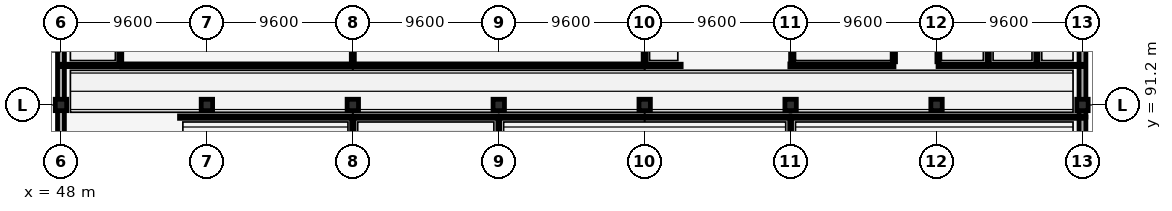
"""IFC4 building model, lengths in metres.
Left out: names, types, materials, properties, quantities, classifications, styles, units other than length and angle.
Written with IfcOpenShell. Run it as: python <this file> out.ifc"""

import sys

from ifc_helpers import new_model, si_unit, direction, frame, frame_2d, origin, origin_2d, place, context, subcontext, project, spatial, rectangle, extrude, element, fill, save


model = new_model("IFC4")
c1 = context("Model", 3, precision=1e-05, world=origin(), true_north=direction((0.0, 1.0)))
c2 = subcontext(c1, "Body", "Model", "MODEL_VIEW")
j1 = project(units=[si_unit("LENGTHUNIT", "METRE"), si_unit("PLANEANGLEUNIT", "RADIAN")], contexts=[c1])
p1 = place(None, origin())
s1 = spatial("IfcSite", under=j1, at=p1, CompositionType="ELEMENT")
p2 = place(p1, origin())
s2 = spatial("IfcBuilding", under=s1, at=p2, CompositionType="ELEMENT")
p3 = place(p2, frame((0.0, 0.0, -4.2)))
s3 = spatial("IfcBuildingStorey", under=s2, at=p3, CompositionType="ELEMENT", Elevation=-4.2)
for number, where, z_axis, x_axis in (
    (1, (48.0, 91.2, 0.0), (0.0, 0.0, 1.0), (1.0, 0.0, 0.0)),
    (2, (57.6, 91.2, 0.0), (0.0, 0.0, 1.0), (1.0, 0.0, 0.0)),
    (3, (67.2, 91.2, 0.0), (0.0, 0.0, 1.0), (1.0, 0.0, 0.0)),
    (4, (76.8, 91.2, 0.0), (0.0, 0.0, 1.0), (1.0, 0.0, 0.0)),
    (5, (86.4, 91.2, 0.0), (0.0, 0.0, 1.0), (1.0, 0.0, 0.0)),
    (6, (96.0, 91.2, 0.0), (0.0, 0.0, 1.0), (1.0, 0.0, 0.0)),
    (7, (105.6, 91.2, 0.0), (0.0, 0.0, 1.0), (1.0, 0.0, 0.0)),
    (8, (115.2, 91.2, 0.0), (0.0, 0.0, 1.0), (1.0, 0.0, 0.0)),
):
    element("IfcColumn", number, at=place(p3, frame(where, z_axis=z_axis, x_axis=x_axis)), inside=s3, PredefinedType="COLUMN", context=c2, shape_type="SweptSolid", body=[
        extrude(rectangle(XDim=0.75, YDim=0.75, at=origin_2d()), origin(), (0.0, 0.0, 1.0), 4.2),
    ])
p4 = place(p3, frame((115.2, 81.2, 0.0), z_axis=(0.0, 0.0, 1.0), x_axis=(0.0, 1.0, 0.0)))
e9 = element("IfcWall", 9, at=p4, inside=s3, PredefinedType="SOLIDWALL", context=c2, shape_type="SweptSolid", body=[
    extrude(rectangle(XDim=9.2, YDim=0.45, at=frame_2d((4.6, 0.0))), origin(), (0.0, 0.0, 1.0), 3.84),
])
p5 = place(p3, frame((115.2, 90.4, 0.0), z_axis=(0.0, 0.0, 1.0), x_axis=(0.0, 1.0, 0.0)))
e10 = element("IfcWall", 10, at=p5, inside=s3, PredefinedType="SOLIDWALL", context=c2, shape_type="SweptSolid", body=[
    extrude(rectangle(XDim=9.2, YDim=0.45, at=frame_2d((4.6, 0.0))), origin(), (0.0, 0.0, 1.0), 3.84),
])
p6 = place(p3, frame((48.0, 95.2, 0.0), z_axis=(0.0, 0.0, 1.0), x_axis=(0.0, -1.0, 0.0)))
e11 = element("IfcWall", 11, at=p6, inside=s3, PredefinedType="SOLIDWALL", context=c2, shape_type="SweptSolid", body=[
    extrude(rectangle(XDim=7.733, YDim=0.45, at=frame_2d((3.866, 0.0))), origin(), (0.0, 0.0, 1.0), 3.84),
])
p7 = place(p3, frame((48.05, 93.8, 0.0), z_axis=(0.0, 0.0, 1.0), x_axis=(1.0, 0.0, 0.0)))
e12 = element("IfcWall", 12, at=p7, inside=s3, PredefinedType="PARTITIONING", context=c2, shape_type="SweptSolid", body=[
    extrude(rectangle(XDim=3.75, YDim=0.16, at=frame_2d((1.875, 0.0))), origin(), (0.0, 0.0, 1.0), 3.84),
])
p8 = place(p7, frame((0.975, 0.0, 0.0)))
e13 = element("IfcOpeningElement", 13, at=p8, cuts=e12, PredefinedType="OPENING", context=c2, shape_type="SweptSolid", body=[
    extrude(rectangle(XDim=1.8, YDim=2.15, at=frame_2d((0.9, 1.075))), frame((0.0, 0.09, 0.0), z_axis=(0.0, -1.0, 0.0), x_axis=(1.0, 0.0, 0.0)), (0.0, 0.0, 1.0), 0.18),
])
p9 = place(p3, frame((51.9, 93.9, 0.0), z_axis=(0.0, 0.0, 1.0), x_axis=(0.0, 1.0, 0.0)))
e14 = element("IfcWall", 14, at=p9, inside=s3, PredefinedType="PARTITIONING", context=c2, shape_type="SweptSolid", body=[
    extrude(rectangle(XDim=6.5, YDim=0.2, at=frame_2d((3.25, 0.0))), origin(), (0.0, 0.0, 1.0), 3.84),
])
p10 = place(p9, frame((2.45, 0.0, 0.0)))
e15 = element("IfcOpeningElement", 15, at=p10, cuts=e14, PredefinedType="OPENING", context=c2, shape_type="SweptSolid", body=[
    extrude(rectangle(XDim=1.6, YDim=2.2, at=frame_2d((0.8, 1.1))), frame((0.0, 0.11, 0.0), z_axis=(0.0, -1.0, 0.0), x_axis=(1.0, 0.0, 0.0)), (0.0, 0.0, 1.0), 0.22),
])
p11 = place(p3, frame((67.2, 81.4, 0.0), z_axis=(0.0, 0.0, 1.0), x_axis=(0.0, 1.0, 0.0)))
e16 = element("IfcWall", 16, at=p11, inside=s3, PredefinedType="PARTITIONING", context=c2, shape_type="SweptSolid", body=[
    extrude(rectangle(XDim=8.9, YDim=0.16, at=frame_2d((4.45, 0.0))), origin(), (0.0, 0.0, 1.0), 3.255),
])
p12 = place(p11, frame((3.9, 0.0, 0.0)))
e17 = element("IfcOpeningElement", 17, at=p12, cuts=e16, PredefinedType="OPENING", context=c2, shape_type="SweptSolid", body=[
    extrude(rectangle(XDim=1.1, YDim=2.18, at=frame_2d((0.55, 1.09))), frame((0.0, 0.09, 0.0), z_axis=(0.0, -1.0, 0.0), x_axis=(1.0, 0.0, 0.0)), (0.0, 0.0, 1.0), 0.18),
])
p13 = place(p3, frame((55.8, 90.4, 0.0), z_axis=(0.0, 0.0, 1.0), x_axis=(1.0, 0.0, 0.0)))
e18 = element("IfcWall", 18, at=p13, inside=s3, PredefinedType="PARTITIONING", context=c2, shape_type="SweptSolid", body=[
    extrude(rectangle(XDim=11.3, YDim=0.16, at=frame_2d((5.65, 0.0))), origin(), (0.0, 0.0, 1.0), 3.84),
])
p14 = place(p13, frame((4.75, 0.0, 0.0)))
e19 = element("IfcOpeningElement", 19, at=p14, cuts=e18, PredefinedType="OPENING", context=c2, shape_type="SweptSolid", body=[
    extrude(rectangle(XDim=1.8, YDim=2.15, at=frame_2d((0.9, 1.075))), frame((0.0, 0.09, 0.0), z_axis=(0.0, -1.0, 0.0), x_axis=(1.0, 0.0, 0.0)), (0.0, 0.0, 1.0), 0.18),
])
p15 = place(p3, frame((76.8, 81.4, 0.0), z_axis=(0.0, 0.0, 1.0), x_axis=(0.0, 1.0, 0.0)))
e20 = element("IfcWall", 20, at=p15, inside=s3, PredefinedType="PARTITIONING", context=c2, shape_type="SweptSolid", body=[
    extrude(rectangle(XDim=8.9, YDim=0.125, at=frame_2d((4.45, 0.0))), origin(), (0.0, 0.0, 1.0), 3.295),
])
p16 = place(p3, frame((67.3, 90.4, 0.0), z_axis=(0.0, 0.0, 1.0), x_axis=(1.0, 0.0, 0.0)))
e21 = element("IfcWall", 21, at=p16, inside=s3, PredefinedType="PARTITIONING", context=c2, shape_type="SweptSolid", body=[
    extrude(rectangle(XDim=9.4, YDim=0.16, at=frame_2d((4.7, 0.0))), origin(), (0.0, 0.0, 1.0), 3.84),
])
p17 = place(p16, frame((4.15, 0.0, 0.0)))
e22 = element("IfcOpeningElement", 22, at=p17, cuts=e21, PredefinedType="OPENING", context=c2, shape_type="SweptSolid", body=[
    extrude(rectangle(XDim=1.1, YDim=2.18, at=frame_2d((0.55, 1.09))), frame((0.0, 0.09, 0.0), z_axis=(0.0, -1.0, 0.0), x_axis=(1.0, 0.0, 0.0)), (0.0, 0.0, 1.0), 0.18),
])
p18 = place(p3, frame((96.0, 72.05, 0.0), z_axis=(0.0, 0.0, 1.0), x_axis=(0.0, 1.0, 0.0)))
e23 = element("IfcWall", 23, at=p18, inside=s3, PredefinedType="PARTITIONING", context=c2, shape_type="SweptSolid", body=[
    extrude(rectangle(XDim=18.25, YDim=0.125, at=frame_2d((9.125, 0.0))), origin(), (0.0, 0.0, 1.0), 3.275),
])
p19 = place(p3, frame((76.9, 90.4, 0.0), z_axis=(0.0, 0.0, 1.0), x_axis=(1.0, 0.0, 0.0)))
e24 = element("IfcWall", 24, at=p19, inside=s3, PredefinedType="PARTITIONING", context=c2, shape_type="SweptSolid", body=[
    extrude(rectangle(XDim=19.05, YDim=0.16, at=frame_2d((9.525, 0.0))), origin(), (0.0, 0.0, 1.0), 3.84),
])
p20 = place(p19, frame((6.391, 0.0, 0.0)))
e25 = element("IfcOpeningElement", 25, at=p20, cuts=e24, PredefinedType="OPENING", context=c2, shape_type="SweptSolid", body=[
    extrude(rectangle(XDim=1.1, YDim=2.18, at=frame_2d((0.55, 1.09))), frame((0.0, 0.09, 0.0), z_axis=(0.0, -1.0, 0.0), x_axis=(1.0, 0.0, 0.0)), (0.0, 0.0, 1.0), 0.18),
])
p21 = place(p3, frame((96.03, 90.4, 0.0), z_axis=(0.0, 0.0, 1.0), x_axis=(1.0, 0.0, 0.0)))
e26 = element("IfcWall", 26, at=p21, inside=s3, PredefinedType="PARTITIONING", context=c2, shape_type="SweptSolid", body=[
    extrude(rectangle(XDim=19.12, YDim=0.16, at=frame_2d((9.56, 0.0))), origin(), (0.0, 0.0, 1.0), 3.84),
])
p22 = place(p21, frame((11.572, 0.0, 0.0)))
e27 = element("IfcOpeningElement", 27, at=p22, cuts=e26, PredefinedType="OPENING", context=c2, shape_type="SweptSolid", body=[
    extrude(rectangle(XDim=1.15, YDim=2.2, at=frame_2d((0.575, 1.1))), frame((0.0, 0.09, 0.0), z_axis=(0.0, -1.0, 0.0), x_axis=(1.0, 0.0, 0.0)), (0.0, 0.0, 1.0), 0.18),
])
p23 = place(p3, frame((86.5, 93.8, 0.0), z_axis=(0.0, 0.0, 1.0), x_axis=(1.0, 0.0, 0.0)))
e28 = element("IfcWall", 28, at=p23, inside=s3, PredefinedType="PARTITIONING", context=c2, shape_type="SweptSolid", body=[
    extrude(rectangle(XDim=2.3, YDim=0.16, at=frame_2d((1.15, 0.0))), origin(), (0.0, 0.0, 1.0), 3.84),
])
p24 = place(p23, frame((0.25, 0.0, 0.0)))
e29 = element("IfcOpeningElement", 29, at=p24, cuts=e28, PredefinedType="OPENING", context=c2, shape_type="SweptSolid", body=[
    extrude(rectangle(XDim=1.8, YDim=2.15, at=frame_2d((0.9, 1.075))), frame((0.0, 0.09, 0.0), z_axis=(0.0, -1.0, 0.0), x_axis=(1.0, 0.0, 0.0)), (0.0, 0.0, 1.0), 0.18),
])
p25 = place(p3, frame((52.0, 93.8, 0.0), z_axis=(0.0, 0.0, 1.0), x_axis=(1.0, 0.0, 0.0)))
e30 = element("IfcWall", 30, at=p25, inside=s3, PredefinedType="PARTITIONING", context=c2, shape_type="SweptSolid", body=[
    extrude(rectangle(XDim=15.1, YDim=0.2, at=frame_2d((7.55, 0.0))), origin(), (0.0, 0.0, 1.0), 3.84),
])
p26 = place(p25, frame((6.75, 0.0, 0.0)))
e31 = element("IfcOpeningElement", 31, at=p26, cuts=e30, PredefinedType="OPENING", context=c2, shape_type="SweptSolid", body=[
    extrude(rectangle(XDim=1.6, YDim=2.2, at=frame_2d((0.8, 1.1))), frame((0.0, 0.11, 0.0), z_axis=(0.0, -1.0, 0.0), x_axis=(1.0, 0.0, 0.0)), (0.0, 0.0, 1.0), 0.22),
])
p27 = place(p3, frame((67.3, 93.8, 0.0), z_axis=(0.0, 0.0, 1.0), x_axis=(1.0, 0.0, 0.0)))
e32 = element("IfcWall", 32, at=p27, inside=s3, PredefinedType="PARTITIONING", context=c2, shape_type="SweptSolid", body=[
    extrude(rectangle(XDim=19.0, YDim=0.2, at=frame_2d((9.5, 0.0))), origin(), (0.0, 0.0, 1.0), 3.84),
])
p28 = place(p27, frame((8.7, 0.0, 0.0)))
e33 = element("IfcOpeningElement", 33, at=p28, cuts=e32, PredefinedType="OPENING", context=c2, shape_type="SweptSolid", body=[
    extrude(rectangle(XDim=1.6, YDim=2.2, at=frame_2d((0.8, 1.1))), frame((0.0, 0.11, 0.0), z_axis=(0.0, -1.0, 0.0), x_axis=(1.0, 0.0, 0.0)), (0.0, 0.0, 1.0), 0.22),
])
p29 = place(p3, frame((95.95, 93.8, 0.0), z_axis=(0.0, 0.0, 1.0), x_axis=(1.0, 0.0, 0.0)))
e34 = element("IfcWall", 34, at=p29, inside=s3, PredefinedType="PARTITIONING", context=c2, shape_type="SweptSolid", body=[
    extrude(rectangle(XDim=6.85, YDim=0.2, at=frame_2d((3.425, 0.0))), origin(), (0.0, 0.0, 1.0), 3.84),
])
p30 = place(p29, frame((2.625, 0.0, 0.0)))
e35 = element("IfcOpeningElement", 35, at=p30, cuts=e34, PredefinedType="OPENING", context=c2, shape_type="SweptSolid", body=[
    extrude(rectangle(XDim=1.6, YDim=2.2, at=frame_2d((0.8, 1.1))), frame((0.0, 0.11, 0.0), z_axis=(0.0, -1.0, 0.0), x_axis=(1.0, 0.0, 0.0)), (0.0, 0.0, 1.0), 0.22),
])
p31 = place(p3, frame((105.7, 93.8, 0.0), z_axis=(0.0, 0.0, 1.0), x_axis=(1.0, 0.0, 0.0)))
e36 = element("IfcWall", 36, at=p31, inside=s3, PredefinedType="PARTITIONING", context=c2, shape_type="SweptSolid", body=[
    extrude(rectangle(XDim=3.2, YDim=0.15, at=frame_2d((1.6, 0.0))), origin(), (0.0, 0.0, 1.0), 3.84),
])
p32 = place(p31, frame((1.15, 0.0, 0.0)))
e37 = element("IfcOpeningElement", 37, at=p32, cuts=e36, PredefinedType="OPENING", context=c2, shape_type="SweptSolid", body=[
    extrude(rectangle(XDim=0.9, YDim=2.15, at=frame_2d((0.45, 1.075))), frame((0.0, 0.085, 0.0), z_axis=(0.0, -1.0, 0.0), x_axis=(1.0, 0.0, 0.0)), (0.0, 0.0, 1.0), 0.17),
])
p33 = place(p3, frame((109.1, 93.8, 0.0), z_axis=(0.0, 0.0, 1.0), x_axis=(1.0, 0.0, 0.0)))
e38 = element("IfcWall", 38, at=p33, inside=s3, PredefinedType="PARTITIONING", context=c2, shape_type="SweptSolid", body=[
    extrude(rectangle(XDim=3.0, YDim=0.15, at=frame_2d((1.5, 0.0))), origin(), (0.0, 0.0, 1.0), 3.84),
])
p34 = place(p33, frame((1.05, 0.0, 0.0)))
e39 = element("IfcOpeningElement", 39, at=p34, cuts=e38, PredefinedType="OPENING", context=c2, shape_type="SweptSolid", body=[
    extrude(rectangle(XDim=0.9, YDim=2.15, at=frame_2d((0.45, 1.075))), frame((0.0, 0.085, 0.0), z_axis=(0.0, -1.0, 0.0), x_axis=(1.0, 0.0, 0.0)), (0.0, 0.0, 1.0), 0.17),
])
p35 = place(p3, frame((112.3, 93.8, 0.0), z_axis=(0.0, 0.0, 1.0), x_axis=(1.0, 0.0, 0.0)))
e40 = element("IfcWall", 40, at=p35, inside=s3, PredefinedType="PARTITIONING", context=c2, shape_type="SweptSolid", body=[
    extrude(rectangle(XDim=2.85, YDim=0.15, at=frame_2d((1.425, 0.0))), origin(), (0.0, 0.0, 1.0), 3.84),
])
p36 = place(p35, frame((0.95, 0.0, 0.0)))
e41 = element("IfcOpeningElement", 41, at=p36, cuts=e40, PredefinedType="OPENING", context=c2, shape_type="SweptSolid", body=[
    extrude(rectangle(XDim=0.95, YDim=2.15, at=frame_2d((0.475, 1.075))), frame((0.0, 0.085, 0.0), z_axis=(0.0, -1.0, 0.0), x_axis=(1.0, 0.0, 0.0)), (0.0, 0.0, 1.0), 0.17),
])
p37 = place(p3, frame((86.4, 93.9, 0.0), z_axis=(0.0, 0.0, 1.0), x_axis=(0.0, 1.0, 0.0)))
e42 = element("IfcWall", 42, at=p37, inside=s3, PredefinedType="PARTITIONING", context=c2, shape_type="SweptSolid", body=[
    extrude(rectangle(XDim=24.05, YDim=0.2, at=frame_2d((12.025, 0.0))), origin(), (0.0, 0.0, 1.0), 3.295),
])
p38 = place(p37, frame((11.225, 0.0, 0.0)))
e43 = element("IfcOpeningElement", 43, at=p38, cuts=e42, PredefinedType="OPENING", context=c2, shape_type="SweptSolid", body=[
    extrude(rectangle(XDim=1.6, YDim=2.2, at=frame_2d((0.8, 1.1))), frame((0.0, 0.11, 0.0), z_axis=(0.0, -1.0, 0.0), x_axis=(1.0, 0.0, 0.0)), (0.0, 0.0, 1.0), 0.22),
])
p39 = place(p3, frame((67.2, 93.9, 0.0), z_axis=(0.0, 0.0, 1.0), x_axis=(0.0, 1.0, 0.0)))
e44 = element("IfcWall", 44, at=p39, inside=s3, PredefinedType="PARTITIONING", context=c2, shape_type="SweptSolid", body=[
    extrude(rectangle(XDim=24.05, YDim=0.2, at=frame_2d((12.025, 0.0))), origin(), (0.0, 0.0, 1.0), 3.255),
])
for number, where, z_axis, x_axis in (
    (45, (109.0, 93.9, 0.0), (0.0, 0.0, 1.0), (0.0, 1.0, 0.0)),
    (46, (112.2, 93.9, 0.0), (0.0, 0.0, 1.0), (0.0, 1.0, 0.0)),
):
    element("IfcWall", number, at=place(p3, frame(where, z_axis=z_axis, x_axis=x_axis)), inside=s3, PredefinedType="PARTITIONING", context=c2, shape_type="SweptSolid", body=[
        extrude(rectangle(XDim=6.9, YDim=0.15, at=frame_2d((3.45, 0.0))), origin(), (0.0, 0.0, 1.0), 3.84),
    ])
p40 = place(p3, frame((96.1, 94.04, 0.0), z_axis=(0.0, 0.0, 1.0), x_axis=(0.0, 1.0, 0.0)))
e47 = element("IfcWall", 47, at=p40, inside=s3, PredefinedType="PARTITIONING", context=c2, shape_type="SweptSolid", body=[
    extrude(rectangle(XDim=6.62, YDim=0.2, at=frame_2d((3.31, 0.0))), origin(), (0.0, 0.0, 1.0), 3.295),
])
p41 = place(p3, frame((102.8, 94.04, 0.0), z_axis=(0.0, 0.0, 1.0), x_axis=(0.0, 1.0, 0.0)))
e48 = element("IfcWall", 48, at=p41, inside=s3, PredefinedType="PARTITIONING", context=c2, shape_type="SweptSolid", body=[
    extrude(rectangle(XDim=6.62, YDim=0.2, at=frame_2d((3.31, 0.0))), origin(), (0.0, 0.0, 1.0), 3.84),
])
p42 = place(p3, frame((105.7, 94.04, 0.0), z_axis=(0.0, 0.0, 1.0), x_axis=(0.0, 1.0, 0.0)))
e49 = element("IfcWall", 49, at=p42, inside=s3, PredefinedType="PARTITIONING", context=c2, shape_type="SweptSolid", body=[
    extrude(rectangle(XDim=6.62, YDim=0.15, at=frame_2d((3.31, 0.0))), origin(), (0.0, 0.0, 1.0), 3.295),
])
p43 = place(p8, origin())
e50 = element("IfcDoor", 50, at=p43, inside=s3, OperationType="DOUBLE_DOOR_SINGLE_SWING", PredefinedType="DOOR", context=c2, shape_type="SweptSolid", body=[
    extrude(rectangle(XDim=1.8, YDim=2.15, at=frame_2d((0.9, 1.075))), frame((0.0, 0.025, 0.0), z_axis=(0.0, -1.0, 0.0), x_axis=(1.0, 0.0, 0.0)), (0.0, 0.0, 1.0), 0.05),
])
fill(e13, e50)
p44 = place(p14, origin())
e51 = element("IfcDoor", 51, at=p44, inside=s3, OperationType="DOUBLE_DOOR_SINGLE_SWING", PredefinedType="DOOR", context=c2, shape_type="SweptSolid", body=[
    extrude(rectangle(XDim=1.8, YDim=2.15, at=frame_2d((0.9, 1.075))), frame((0.0, 0.025, 0.0), z_axis=(0.0, -1.0, 0.0), x_axis=(1.0, 0.0, 0.0)), (0.0, 0.0, 1.0), 0.05),
])
fill(e19, e51)
p45 = place(p17, origin())
e52 = element("IfcDoor", 52, at=p45, inside=s3, OperationType="SINGLE_SWING_RIGHT", PredefinedType="DOOR", context=c2, shape_type="SweptSolid", body=[
    extrude(rectangle(XDim=1.1, YDim=2.18, at=frame_2d((0.55, 1.09))), frame((0.0, 0.025, 0.0), z_axis=(0.0, -1.0, 0.0), x_axis=(1.0, 0.0, 0.0)), (0.0, 0.0, 1.0), 0.05),
])
fill(e22, e52)
p46 = place(p20, origin())
e53 = element("IfcDoor", 53, at=p46, inside=s3, OperationType="SINGLE_SWING_LEFT", PredefinedType="DOOR", context=c2, shape_type="SweptSolid", body=[
    extrude(rectangle(XDim=1.1, YDim=2.18, at=frame_2d((0.55, 1.09))), frame((0.0, 0.025, 0.0), z_axis=(0.0, -1.0, 0.0), x_axis=(1.0, 0.0, 0.0)), (0.0, 0.0, 1.0), 0.05),
])
fill(e25, e53)
p47 = place(p22, origin())
e54 = element("IfcDoor", 54, at=p47, inside=s3, OperationType="SINGLE_SWING_RIGHT", PredefinedType="DOOR", context=c2, shape_type="SweptSolid", body=[
    extrude(rectangle(XDim=1.15, YDim=2.2, at=frame_2d((0.575, 1.1))), frame((0.0, 0.025, 0.0), z_axis=(0.0, -1.0, 0.0), x_axis=(1.0, 0.0, 0.0)), (0.0, 0.0, 1.0), 0.05),
])
fill(e27, e54)
p48 = place(p24, origin())
e55 = element("IfcDoor", 55, at=p48, inside=s3, OperationType="DOUBLE_DOOR_SINGLE_SWING", PredefinedType="DOOR", context=c2, shape_type="SweptSolid", body=[
    extrude(rectangle(XDim=1.8, YDim=2.15, at=frame_2d((0.9, 1.075))), frame((0.0, 0.025, 0.0), z_axis=(0.0, -1.0, 0.0), x_axis=(1.0, 0.0, 0.0)), (0.0, 0.0, 1.0), 0.05),
])
fill(e29, e55)
p49 = place(p26, origin())
e56 = element("IfcDoor", 56, at=p49, inside=s3, OperationType="DOUBLE_DOOR_SINGLE_SWING", PredefinedType="DOOR", context=c2, shape_type="SweptSolid", body=[
    extrude(rectangle(XDim=1.6, YDim=2.2, at=frame_2d((0.8, 1.1))), frame((0.0, 0.025, 0.0), z_axis=(0.0, -1.0, 0.0), x_axis=(1.0, 0.0, 0.0)), (0.0, 0.0, 1.0), 0.05),
])
fill(e31, e56)
p50 = place(p28, origin())
e57 = element("IfcDoor", 57, at=p50, inside=s3, OperationType="DOUBLE_DOOR_SINGLE_SWING", PredefinedType="DOOR", context=c2, shape_type="SweptSolid", body=[
    extrude(rectangle(XDim=1.6, YDim=2.2, at=frame_2d((0.8, 1.1))), frame((0.0, 0.025, 0.0), z_axis=(0.0, -1.0, 0.0), x_axis=(1.0, 0.0, 0.0)), (0.0, 0.0, 1.0), 0.05),
])
fill(e33, e57)
p51 = place(p30, origin())
e58 = element("IfcDoor", 58, at=p51, inside=s3, OperationType="DOUBLE_DOOR_SINGLE_SWING", PredefinedType="DOOR", context=c2, shape_type="SweptSolid", body=[
    extrude(rectangle(XDim=1.6, YDim=2.2, at=frame_2d((0.8, 1.1))), frame((0.0, 0.025, 0.0), z_axis=(0.0, -1.0, 0.0), x_axis=(1.0, 0.0, 0.0)), (0.0, 0.0, 1.0), 0.05),
])
fill(e35, e58)
p52 = place(p32, origin())
e59 = element("IfcDoor", 59, at=p52, inside=s3, OperationType="SINGLE_SWING_LEFT", PredefinedType="DOOR", context=c2, shape_type="SweptSolid", body=[
    extrude(rectangle(XDim=0.9, YDim=2.15, at=frame_2d((0.45, 1.075))), frame((0.0, 0.025, 0.0), z_axis=(0.0, -1.0, 0.0), x_axis=(1.0, 0.0, 0.0)), (0.0, 0.0, 1.0), 0.05),
])
fill(e37, e59)
p53 = place(p34, origin())
e60 = element("IfcDoor", 60, at=p53, inside=s3, OperationType="SINGLE_SWING_RIGHT", PredefinedType="DOOR", context=c2, shape_type="SweptSolid", body=[
    extrude(rectangle(XDim=0.9, YDim=2.15, at=frame_2d((0.45, 1.075))), frame((0.0, 0.025, 0.0), z_axis=(0.0, -1.0, 0.0), x_axis=(1.0, 0.0, 0.0)), (0.0, 0.0, 1.0), 0.05),
])
fill(e39, e60)
p54 = place(p36, origin())
e61 = element("IfcDoor", 61, at=p54, inside=s3, OperationType="SINGLE_SWING_LEFT", PredefinedType="DOOR", context=c2, shape_type="SweptSolid", body=[
    extrude(rectangle(XDim=0.95, YDim=2.15, at=frame_2d((0.475, 1.075))), frame((0.0, 0.025, 0.0), z_axis=(0.0, -1.0, 0.0), x_axis=(1.0, 0.0, 0.0)), (0.0, 0.0, 1.0), 0.05),
])
fill(e41, e61)
save(model, sys.argv[1])
